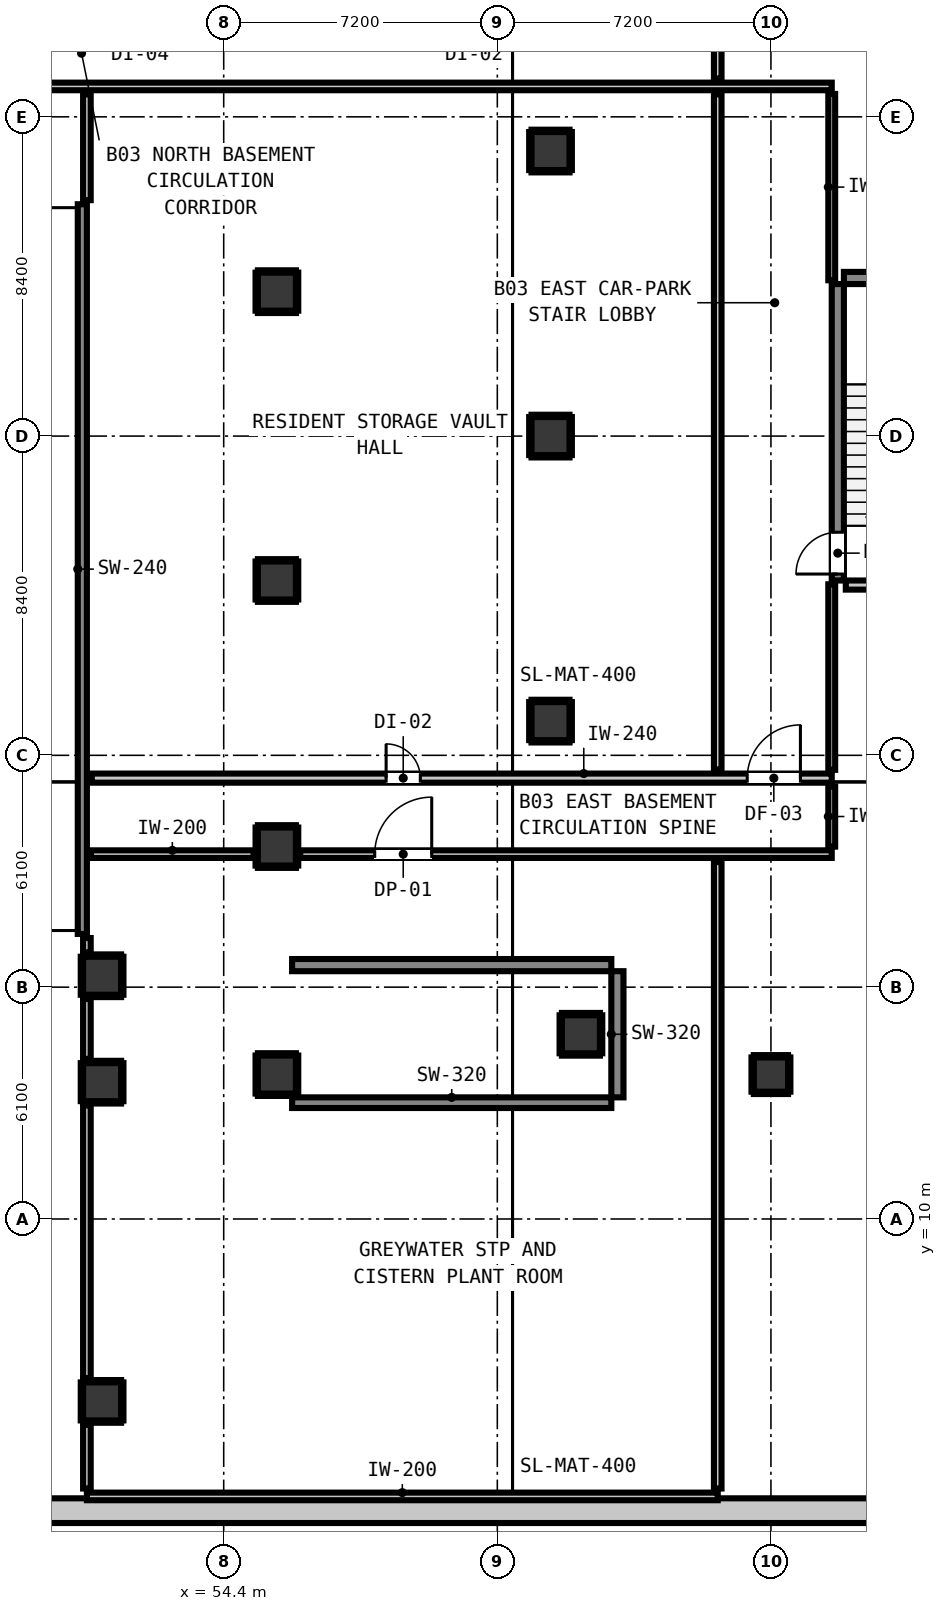
"""IFC4 building model, lengths in metres.
Left out: names, types, materials, properties, quantities, classifications, styles, units other than length and angle.
Written with IfcOpenShell. Run it as: python <this file> out.ifc"""

import sys

from ifc_helpers import new_model, si_unit, direction, frame, frame_2d, origin, origin_2d, place, context, subcontext, project, spatial, rectangle, circle, extrude, element, fill, save


model = new_model("IFC4")
c1 = context("Model", 3, precision=1e-05, world=origin(), true_north=direction((0.0, 1.0)))
c2 = subcontext(c1, "Body", "Model", "MODEL_VIEW")
j1 = project(units=[si_unit("LENGTHUNIT", "METRE"), si_unit("PLANEANGLEUNIT", "RADIAN")], contexts=[c1])
p1 = place(None, origin())
s1 = spatial("IfcSite", under=j1, at=p1, CompositionType="ELEMENT")
p2 = place(p1, origin())
s2 = spatial("IfcBuilding", under=s1, at=p2, CompositionType="ELEMENT")
p3 = place(p2, frame((0.0, 0.0, -13.2)))
s3 = spatial("IfcBuildingStorey", under=s2, at=p3, CompositionType="ELEMENT", Elevation=-13.2)
p4 = place(p3, frame((1.5, 2.325, 0.0), z_axis=(0.0, 0.0, 1.0), x_axis=(1.0, 0.0, 0.0)))
e1 = element("IfcWall", 1, at=p4, inside=s3, PredefinedType="SOLIDWALL", context=c2, shape_type="SweptSolid", body=[
    extrude(rectangle(XDim=83.5, YDim=0.65, at=frame_2d((41.75, 0.0))), origin(), (0.0, 0.0, 1.0), 4.4),
])
p5 = place(p3, frame((64.76, 13.2, 0.0), z_axis=(0.0, 0.0, 1.0), x_axis=(0.0, 1.0, 0.0)))
e2 = element("IfcWall", 2, at=p5, inside=s3, PredefinedType="SHEAR", context=c2, shape_type="SweptSolid", body=[
    extrude(rectangle(XDim=3.32, YDim=0.32, at=frame_2d((1.66, 0.0))), origin(), (0.0, 0.0, 1.0), 4.4),
])
p6 = place(p3, frame((56.2, 13.06, 0.0), z_axis=(0.0, 0.0, 1.0), x_axis=(1.0, 0.0, 0.0)))
e3 = element("IfcWall", 3, at=p6, inside=s3, PredefinedType="SHEAR", context=c2, shape_type="SweptSolid", body=[
    extrude(rectangle(XDim=8.4, YDim=0.28, at=frame_2d((4.2, 0.0))), origin(), (0.0, 0.0, 1.0), 4.4),
])
p7 = place(p3, frame((56.2, 16.68, 0.0), z_axis=(0.0, 0.0, 1.0), x_axis=(1.0, 0.0, 0.0)))
e4 = element("IfcWall", 4, at=p7, inside=s3, PredefinedType="SHEAR", context=c2, shape_type="SweptSolid", body=[
    extrude(rectangle(XDim=8.4, YDim=0.32, at=frame_2d((4.2, 0.0))), origin(), (0.0, 0.0, 1.0), 4.4),
])
p8 = place(p3, frame((70.72, 34.76, 0.0), z_axis=(0.0, 0.0, 1.0), x_axis=(1.0, 0.0, 0.0)))
e5 = element("IfcWall", 5, at=p8, inside=s3, PredefinedType="SHEAR", context=c2, shape_type="SweptSolid", body=[
    extrude(rectangle(XDim=3.08, YDim=0.32, at=frame_2d((1.54, 0.0))), origin(), (0.0, 0.0, 1.0), 4.4),
])
p9 = place(p3, frame((70.56, 26.8, 0.0), z_axis=(0.0, 0.0, 1.0), x_axis=(0.0, 1.0, 0.0)))
e6 = element("IfcWall", 6, at=p9, inside=s3, PredefinedType="SHEAR", context=c2, shape_type="SweptSolid", body=[
    extrude(rectangle(XDim=7.8, YDim=0.32, at=frame_2d((3.9, 0.0))), origin(), (0.0, 0.0, 1.0), 4.4),
])
p10 = place(p9, frame((0.17, 0.0, 0.0)))
e7 = element("IfcOpeningElement", 7, at=p10, cuts=e6, PredefinedType="OPENING", context=c2, shape_type="SweptSolid", body=[
    extrude(rectangle(XDim=1.1, YDim=2.15, at=frame_2d((0.55, 1.075))), frame((0.0, 0.17, 0.0), z_axis=(0.0, -1.0, 0.0), x_axis=(1.0, 0.0, 0.0)), (0.0, 0.0, 1.0), 0.34),
])
p11 = place(p3, frame((50.68, 17.5, 0.0), z_axis=(0.0, 0.0, 1.0), x_axis=(0.0, 1.0, 0.0)))
e8 = element("IfcWall", 8, at=p11, inside=s3, PredefinedType="SHEAR", context=c2, shape_type="SweptSolid", body=[
    extrude(rectangle(XDim=19.2, YDim=0.24, at=frame_2d((9.6, 0.0))), origin(), (0.0, 0.0, 1.0), 4.4),
])
for number, where, z_axis, x_axis in (
    (9, (63.0, 23.1, -0.4), (0.0, 0.0, 1.0), (1.0, 0.0, 0.0)),
    (10, (63.0, 30.6, -0.4), (0.0, 0.0, 1.0), (1.0, 0.0, 0.0)),
    (11, (63.0, 38.1, -0.4), (0.0, 0.0, 1.0), (1.0, 0.0, 0.0)),
    (12, (51.2, 13.6, -0.4), (0.0, 0.0, 1.0), (1.0, 0.0, 0.0)),
    (13, (51.2, 16.4, -0.4), (0.0, 0.0, 1.0), (1.0, 0.0, 0.0)),
    (14, (51.2, 5.2, -0.4), (0.0, 0.0, 1.0), (1.0, 0.0, 0.0)),
    (15, (63.8, 14.86, -0.4), (0.0, 0.0, 1.0), (1.0, 0.0, 0.0)),
    (16, (55.8, 13.8, -0.4), (0.0, 0.0, 1.0), (1.0, 0.0, 0.0)),
    (17, (55.8, 19.8, -0.4), (0.0, 0.0, 1.0), (1.0, 0.0, 0.0)),
    (18, (55.8, 26.8, -0.4), (0.0, 0.0, 1.0), (1.0, 0.0, 0.0)),
    (19, (55.8, 34.4, -0.4), (0.0, 0.0, 1.0), (1.0, 0.0, 0.0)),
):
    element("IfcColumn", number, at=place(p3, frame(where, z_axis=z_axis, x_axis=x_axis)), inside=s3, PredefinedType="COLUMN", context=c2, shape_type="SweptSolid", body=[
        extrude(rectangle(XDim=1.0, YDim=1.0, at=origin_2d()), origin(), (0.0, 0.0, 1.0), 4.8),
    ])
p12 = place(p3, frame((68.8, 13.8, -0.4), z_axis=(0.0, 0.0, 1.0), x_axis=(1.0, 0.0, 0.0)))
e20 = element("IfcColumn", 20, at=p12, inside=s3, PredefinedType="COLUMN", context=c2, shape_type="SweptSolid", body=[
    extrude(circle(Radius=0.45, at=origin_2d()), origin(), (0.0, 0.0, 1.0), 4.8),
])
p13 = place(p3, frame((70.77, 26.68, 0.0), z_axis=(0.0, 0.0, 1.0), x_axis=(1.0, 0.0, 0.0)))
e21 = element("IfcWall", 21, at=p13, inside=s3, PredefinedType="PARTITIONING", context=c2, shape_type="SweptSolid", body=[
    extrude(rectangle(XDim=2.98, YDim=0.24, at=frame_2d((1.49, 0.0))), origin(), (0.0, 0.0, 1.0), 4.1),
])
p14 = place(p3, frame((50.928, 21.6, 0.0), z_axis=(0.0, 0.0, 1.0), x_axis=(1.0, 0.0, 0.0)))
e22 = element("IfcWall", 22, at=p14, inside=s3, PredefinedType="PARTITIONING", context=c2, shape_type="SweptSolid", body=[
    extrude(rectangle(XDim=19.472, YDim=0.24, at=frame_2d((9.736, 0.0))), origin(), (0.0, 0.0, 1.0), 4.1),
])
p15 = place(p14, frame((17.248, 0.0, 0.0)))
e23 = element("IfcOpeningElement", 23, at=p15, cuts=e22, PredefinedType="OPENING", context=c2, shape_type="SweptSolid", body=[
    extrude(rectangle(XDim=1.4, YDim=2.15, at=frame_2d((0.7, 1.075))), frame((0.0, 0.13, 0.0), z_axis=(0.0, -1.0, 0.0), x_axis=(1.0, 0.0, 0.0)), (0.0, 0.0, 1.0), 0.26),
])
p16 = place(p14, frame((7.746, 0.0, 0.0)))
e24 = element("IfcOpeningElement", 24, at=p16, cuts=e22, PredefinedType="OPENING", context=c2, shape_type="SweptSolid", body=[
    extrude(rectangle(XDim=0.9, YDim=2.1, at=frame_2d((0.45, 1.05))), frame((0.0, 0.13, 0.0), z_axis=(0.0, -1.0, 0.0), x_axis=(1.0, 0.0, 0.0)), (0.0, 0.0, 1.0), 0.26),
])
p17 = place(p3, frame((50.8, 2.7, 0.0), z_axis=(0.0, 0.0, 1.0), x_axis=(1.0, 0.0, 0.0)))
e25 = element("IfcWall", 25, at=p17, inside=s3, PredefinedType="PARTITIONING", context=c2, shape_type="SweptSolid", body=[
    extrude(rectangle(XDim=16.6, YDim=0.2, at=frame_2d((8.3, 0.0))), origin(), (0.0, 0.0, 1.0), 4.1),
])
p18 = place(p3, frame((50.908, 19.6, 0.0), z_axis=(0.0, 0.0, 1.0), x_axis=(1.0, 0.0, 0.0)))
e26 = element("IfcWall", 26, at=p18, inside=s3, PredefinedType="PARTITIONING", context=c2, shape_type="SweptSolid", body=[
    extrude(rectangle(XDim=4.28, YDim=0.2, at=frame_2d((2.14, 0.0))), origin(), (0.0, 0.0, 1.0), 4.1),
])
p19 = place(p3, frame((56.412, 19.6, 0.0), z_axis=(0.0, 0.0, 1.0), x_axis=(1.0, 0.0, 0.0)))
e27 = element("IfcWall", 27, at=p19, inside=s3, PredefinedType="PARTITIONING", context=c2, shape_type="SweptSolid", body=[
    extrude(rectangle(XDim=13.988, YDim=0.2, at=frame_2d((6.994, 0.0))), origin(), (0.0, 0.0, 1.0), 4.1),
])
p20 = place(p19, frame((1.962, 0.0, 0.0)))
e28 = element("IfcOpeningElement", 28, at=p20, cuts=e27, PredefinedType="OPENING", context=c2, shape_type="SweptSolid", body=[
    extrude(rectangle(XDim=1.5, YDim=2.15, at=frame_2d((0.75, 1.075))), frame((0.0, 0.11, 0.0), z_axis=(0.0, -1.0, 0.0), x_axis=(1.0, 0.0, 0.0)), (0.0, 0.0, 1.0), 0.22),
])
p21 = place(p3, frame((47.312, 39.8, 0.0), z_axis=(0.0, 0.0, 1.0), x_axis=(1.0, 0.0, 0.0)))
e29 = element("IfcWall", 29, at=p21, inside=s3, PredefinedType="PARTITIONING", context=c2, shape_type="SweptSolid", body=[
    extrude(rectangle(XDim=23.088, YDim=0.2, at=frame_2d((11.544, 0.0))), origin(), (0.0, 0.0, 1.0), 4.1),
])
p22 = place(p3, frame((50.8, 2.908, 0.0), z_axis=(0.0, 0.0, 1.0), x_axis=(0.0, 1.0, 0.0)))
e30 = element("IfcWall", 30, at=p22, inside=s3, PredefinedType="PARTITIONING", context=c2, shape_type="SweptSolid", body=[
    extrude(rectangle(XDim=1.68, YDim=0.2, at=frame_2d((0.84, 0.0))), origin(), (0.0, 0.0, 1.0), 4.1),
])
p23 = place(p3, frame((50.8, 5.812, 0.0), z_axis=(0.0, 0.0, 1.0), x_axis=(0.0, 1.0, 0.0)))
e31 = element("IfcWall", 31, at=p23, inside=s3, PredefinedType="PARTITIONING", context=c2, shape_type="SweptSolid", body=[
    extrude(rectangle(XDim=7.176, YDim=0.2, at=frame_2d((3.588, 0.0))), origin(), (0.0, 0.0, 1.0), 4.1),
])
p24 = place(p3, frame((50.8, 14.212, 0.0), z_axis=(0.0, 0.0, 1.0), x_axis=(0.0, 1.0, 0.0)))
e32 = element("IfcWall", 32, at=p24, inside=s3, PredefinedType="PARTITIONING", context=c2, shape_type="SweptSolid", body=[
    extrude(rectangle(XDim=1.576, YDim=0.2, at=frame_2d((0.788, 0.0))), origin(), (0.0, 0.0, 1.0), 4.1),
])
p25 = place(p3, frame((50.8, 17.012, 0.0), z_axis=(0.0, 0.0, 1.0), x_axis=(0.0, 1.0, 0.0)))
e33 = element("IfcWall", 33, at=p25, inside=s3, PredefinedType="PARTITIONING", context=c2, shape_type="SweptSolid", body=[
    extrude(rectangle(XDim=0.38, YDim=0.2, at=frame_2d((0.19, 0.0))), origin(), (0.0, 0.0, 1.0), 4.1),
])
p26 = place(p3, frame((50.8, 36.808, 0.0), z_axis=(0.0, 0.0, 1.0), x_axis=(0.0, 1.0, 0.0)))
e34 = element("IfcWall", 34, at=p26, inside=s3, PredefinedType="PARTITIONING", context=c2, shape_type="SweptSolid", body=[
    extrude(rectangle(XDim=2.784, YDim=0.2, at=frame_2d((1.392, 0.0))), origin(), (0.0, 0.0, 1.0), 4.1),
])
p27 = place(p3, frame((67.4, 2.908, 0.0), z_axis=(0.0, 0.0, 1.0), x_axis=(0.0, 1.0, 0.0)))
e35 = element("IfcWall", 35, at=p27, inside=s3, PredefinedType="PARTITIONING", context=c2, shape_type="SweptSolid", body=[
    extrude(rectangle(XDim=16.484, YDim=0.2, at=frame_2d((8.242, 0.0))), origin(), (0.0, 0.0, 1.0), 4.1),
])
p28 = place(p3, frame((67.4, 21.828, 0.0), z_axis=(0.0, 0.0, 1.0), x_axis=(0.0, 1.0, 0.0)))
e36 = element("IfcWall", 36, at=p28, inside=s3, PredefinedType="PARTITIONING", context=c2, shape_type="SweptSolid", body=[
    extrude(rectangle(XDim=17.764, YDim=0.2, at=frame_2d((8.882, 0.0))), origin(), (0.0, 0.0, 1.0), 4.1),
])
p29 = place(p3, frame((67.4, 40.008, 0.0), z_axis=(0.0, 0.0, 1.0), x_axis=(0.0, 1.0, 0.0)))
e37 = element("IfcWall", 37, at=p29, inside=s3, PredefinedType="PARTITIONING", context=c2, shape_type="SweptSolid", body=[
    extrude(rectangle(XDim=1.384, YDim=0.2, at=frame_2d((0.692, 0.0))), origin(), (0.0, 0.0, 1.0), 4.1),
])
p30 = place(p3, frame((70.4, 19.798, 0.0), z_axis=(0.0, 0.0, 1.0), x_axis=(0.0, 1.0, 0.0)))
e38 = element("IfcWall", 38, at=p30, inside=s3, PredefinedType="PARTITIONING", context=c2, shape_type="SweptSolid", body=[
    extrude(rectangle(XDim=1.584, YDim=0.18, at=frame_2d((0.792, 0.0))), origin(), (0.0, 0.0, 1.0), 4.1),
])
p31 = place(p3, frame((70.4, 21.818, 0.0), z_axis=(0.0, 0.0, 1.0), x_axis=(0.0, 1.0, 0.0)))
e39 = element("IfcWall", 39, at=p31, inside=s3, PredefinedType="PARTITIONING", context=c2, shape_type="SweptSolid", body=[
    extrude(rectangle(XDim=4.882, YDim=0.18, at=frame_2d((2.441, 0.0))), origin(), (0.0, 0.0, 1.0), 4.1),
])
p32 = place(p3, frame((70.4, 34.7, 0.0), z_axis=(0.0, 0.0, 1.0), x_axis=(0.0, 1.0, 0.0)))
e40 = element("IfcWall", 40, at=p32, inside=s3, PredefinedType="PARTITIONING", context=c2, shape_type="SweptSolid", body=[
    extrude(rectangle(XDim=4.902, YDim=0.18, at=frame_2d((2.451, 0.0))), origin(), (0.0, 0.0, 1.0), 4.1),
])
for number, where, z_axis, x_axis in (
    (41, (62.5, 22.568, 0.0), (0.0, 0.0, 1.0), (1.0, 0.0, 0.0)),
    (42, (62.5, 23.632, 0.0), (0.0, 0.0, 1.0), (1.0, 0.0, 0.0)),
    (43, (62.468, 22.6, 0.0), (0.0, 0.0, 1.0), (0.0, 1.0, 0.0)),
    (44, (63.532, 22.6, 0.0), (0.0, 0.0, 1.0), (0.0, 1.0, 0.0)),
    (45, (62.5, 30.068, 0.0), (0.0, 0.0, 1.0), (1.0, 0.0, 0.0)),
    (46, (62.5, 31.132, 0.0), (0.0, 0.0, 1.0), (1.0, 0.0, 0.0)),
    (47, (62.468, 30.1, 0.0), (0.0, 0.0, 1.0), (0.0, 1.0, 0.0)),
    (48, (63.532, 30.1, 0.0), (0.0, 0.0, 1.0), (0.0, 1.0, 0.0)),
    (49, (62.5, 37.568, 0.0), (0.0, 0.0, 1.0), (1.0, 0.0, 0.0)),
    (50, (62.5, 38.632, 0.0), (0.0, 0.0, 1.0), (1.0, 0.0, 0.0)),
    (51, (62.468, 37.6, 0.0), (0.0, 0.0, 1.0), (0.0, 1.0, 0.0)),
    (52, (63.532, 37.6, 0.0), (0.0, 0.0, 1.0), (0.0, 1.0, 0.0)),
    (53, (50.7, 13.068, 0.0), (0.0, 0.0, 1.0), (1.0, 0.0, 0.0)),
    (54, (50.7, 14.132, 0.0), (0.0, 0.0, 1.0), (1.0, 0.0, 0.0)),
    (55, (50.668, 13.1, 0.0), (0.0, 0.0, 1.0), (0.0, 1.0, 0.0)),
    (56, (51.732, 13.1, 0.0), (0.0, 0.0, 1.0), (0.0, 1.0, 0.0)),
    (57, (50.7, 15.868, 0.0), (0.0, 0.0, 1.0), (1.0, 0.0, 0.0)),
    (58, (50.7, 16.932, 0.0), (0.0, 0.0, 1.0), (1.0, 0.0, 0.0)),
    (59, (50.668, 15.9, 0.0), (0.0, 0.0, 1.0), (0.0, 1.0, 0.0)),
    (60, (51.732, 15.9, 0.0), (0.0, 0.0, 1.0), (0.0, 1.0, 0.0)),
    (61, (50.7, 4.668, 0.0), (0.0, 0.0, 1.0), (1.0, 0.0, 0.0)),
    (62, (50.7, 5.732, 0.0), (0.0, 0.0, 1.0), (1.0, 0.0, 0.0)),
    (63, (50.668, 4.7, 0.0), (0.0, 0.0, 1.0), (0.0, 1.0, 0.0)),
    (64, (51.732, 4.7, 0.0), (0.0, 0.0, 1.0), (0.0, 1.0, 0.0)),
    (65, (63.3, 14.328, 0.0), (0.0, 0.0, 1.0), (1.0, 0.0, 0.0)),
    (66, (63.3, 15.392, 0.0), (0.0, 0.0, 1.0), (1.0, 0.0, 0.0)),
    (67, (63.268, 14.36, 0.0), (0.0, 0.0, 1.0), (0.0, 1.0, 0.0)),
    (68, (64.332, 14.36, 0.0), (0.0, 0.0, 1.0), (0.0, 1.0, 0.0)),
    (69, (55.3, 13.268, 0.0), (0.0, 0.0, 1.0), (1.0, 0.0, 0.0)),
    (70, (55.3, 14.332, 0.0), (0.0, 0.0, 1.0), (1.0, 0.0, 0.0)),
    (71, (55.268, 13.3, 0.0), (0.0, 0.0, 1.0), (0.0, 1.0, 0.0)),
    (72, (56.332, 13.3, 0.0), (0.0, 0.0, 1.0), (0.0, 1.0, 0.0)),
    (73, (55.3, 19.268, 0.0), (0.0, 0.0, 1.0), (1.0, 0.0, 0.0)),
    (74, (55.3, 20.332, 0.0), (0.0, 0.0, 1.0), (1.0, 0.0, 0.0)),
    (75, (55.268, 19.3, 0.0), (0.0, 0.0, 1.0), (0.0, 1.0, 0.0)),
    (76, (56.332, 19.3, 0.0), (0.0, 0.0, 1.0), (0.0, 1.0, 0.0)),
    (77, (55.3, 26.268, 0.0), (0.0, 0.0, 1.0), (1.0, 0.0, 0.0)),
    (78, (55.3, 27.332, 0.0), (0.0, 0.0, 1.0), (1.0, 0.0, 0.0)),
    (79, (55.268, 26.3, 0.0), (0.0, 0.0, 1.0), (0.0, 1.0, 0.0)),
    (80, (56.332, 26.3, 0.0), (0.0, 0.0, 1.0), (0.0, 1.0, 0.0)),
    (81, (55.3, 33.868, 0.0), (0.0, 0.0, 1.0), (1.0, 0.0, 0.0)),
    (82, (55.3, 34.932, 0.0), (0.0, 0.0, 1.0), (1.0, 0.0, 0.0)),
    (83, (55.268, 33.9, 0.0), (0.0, 0.0, 1.0), (0.0, 1.0, 0.0)),
    (84, (56.332, 33.9, 0.0), (0.0, 0.0, 1.0), (0.0, 1.0, 0.0)),
):
    element("IfcWall", number, at=place(p3, frame(where, z_axis=z_axis, x_axis=x_axis)), inside=s3, PredefinedType="PARTITIONING", context=c2, shape_type="SweptSolid", body=[
        extrude(rectangle(XDim=1.0, YDim=0.06, at=frame_2d((0.5, 0.0))), origin(), (0.0, 0.0, 1.0), 1.45),
    ])
for number, where, z_axis, x_axis in (
    (85, (68.35, 13.318, 0.0), (0.0, 0.0, 1.0), (1.0, 0.0, 0.0)),
    (86, (68.35, 14.282, 0.0), (0.0, 0.0, 1.0), (1.0, 0.0, 0.0)),
    (87, (68.318, 13.35, 0.0), (0.0, 0.0, 1.0), (0.0, 1.0, 0.0)),
    (88, (69.282, 13.35, 0.0), (0.0, 0.0, 1.0), (0.0, 1.0, 0.0)),
):
    element("IfcWall", number, at=place(p3, frame(where, z_axis=z_axis, x_axis=x_axis)), inside=s3, PredefinedType="PARTITIONING", context=c2, shape_type="SweptSolid", body=[
        extrude(rectangle(XDim=0.9, YDim=0.06, at=frame_2d((0.45, 0.0))), origin(), (0.0, 0.0, 1.0), 1.45),
    ])
p33 = place(p10, origin())
e89 = element("IfcDoor", 89, at=p33, inside=s3, OperationType="SINGLE_SWING_LEFT", PredefinedType="DOOR", context=c2, shape_type="SweptSolid", body=[
    extrude(rectangle(XDim=1.1, YDim=2.15, at=frame_2d((0.55, 1.075))), frame((0.0, 0.025, 0.0), z_axis=(0.0, -1.0, 0.0), x_axis=(1.0, 0.0, 0.0)), (0.0, 0.0, 1.0), 0.05),
])
fill(e7, e89)
p34 = place(p15, origin())
e90 = element("IfcDoor", 90, at=p34, inside=s3, OperationType="SINGLE_SWING_RIGHT", PredefinedType="DOOR", context=c2, shape_type="SweptSolid", body=[
    extrude(rectangle(XDim=1.4, YDim=2.15, at=frame_2d((0.7, 1.075))), frame((0.0, 0.025, 0.0), z_axis=(0.0, -1.0, 0.0), x_axis=(1.0, 0.0, 0.0)), (0.0, 0.0, 1.0), 0.05),
])
fill(e23, e90)
p35 = place(p20, origin())
e91 = element("IfcDoor", 91, at=p35, inside=s3, OperationType="SINGLE_SWING_RIGHT", PredefinedType="DOOR", context=c2, shape_type="SweptSolid", body=[
    extrude(rectangle(XDim=1.5, YDim=2.15, at=frame_2d((0.75, 1.075))), frame((0.0, 0.025, 0.0), z_axis=(0.0, -1.0, 0.0), x_axis=(1.0, 0.0, 0.0)), (0.0, 0.0, 1.0), 0.05),
])
fill(e28, e91)
p36 = place(p16, origin())
e92 = element("IfcDoor", 92, at=p36, inside=s3, OperationType="SINGLE_SWING_LEFT", PredefinedType="DOOR", context=c2, shape_type="SweptSolid", body=[
    extrude(rectangle(XDim=0.9, YDim=2.1, at=frame_2d((0.45, 1.05))), frame((0.0, 0.025, 0.0), z_axis=(0.0, -1.0, 0.0), x_axis=(1.0, 0.0, 0.0)), (0.0, 0.0, 1.0), 0.05),
])
fill(e24, e92)
save(model, sys.argv[1])
